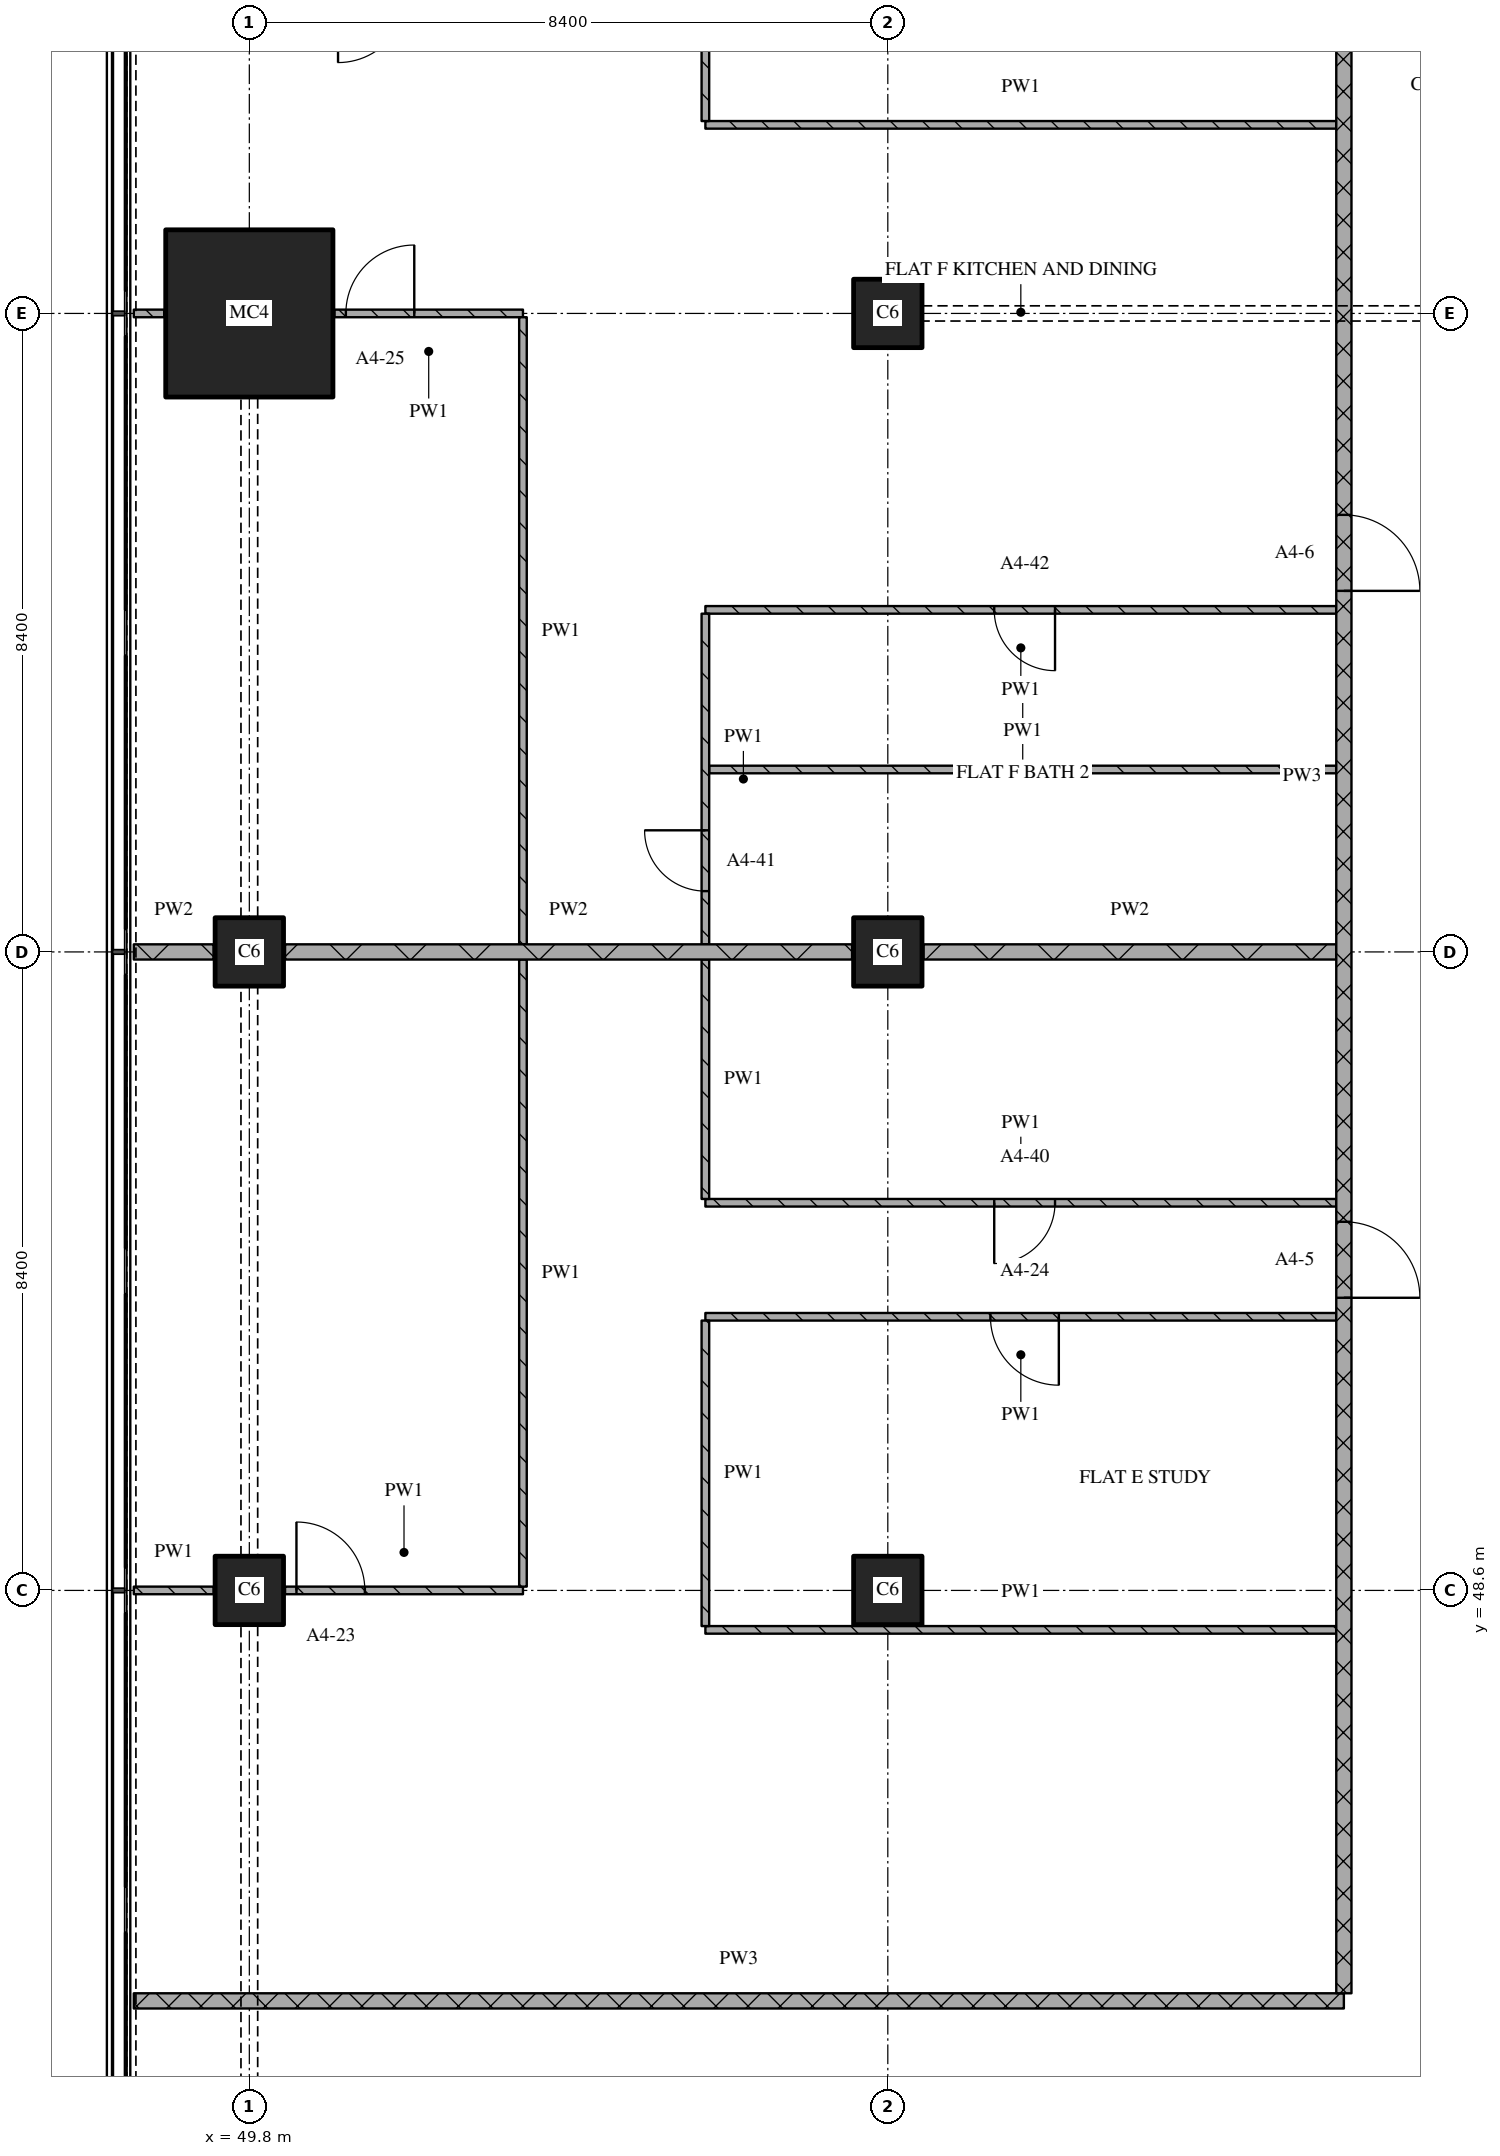
"""IFC4 building model, lengths in metres.
Left out: names, types, materials, properties, quantities, classifications, styles, units other than length and angle.
Written with IfcOpenShell. Run it as: python <this file> out.ifc"""

import sys

from ifc_helpers import new_model, si_unit, direction, frame, frame_2d, origin, origin_2d, place, context, subcontext, project, spatial, rectangle, extrude, element, fill, save


model = new_model("IFC4")
c1 = context("Model", 3, precision=1e-05, world=origin(), true_north=direction((0.0, 1.0)))
c2 = subcontext(c1, "Body", "Model", "MODEL_VIEW")
j1 = project(units=[si_unit("LENGTHUNIT", "METRE"), si_unit("PLANEANGLEUNIT", "RADIAN")], contexts=[c1])
p1 = place(None, origin())
s1 = spatial("IfcSite", under=j1, at=p1, CompositionType="ELEMENT")
p2 = place(p1, origin())
s2 = spatial("IfcBuilding", under=s1, at=p2, CompositionType="ELEMENT")
p3 = place(p2, frame((0.0, 0.0, 73.2)))
s3 = spatial("IfcBuildingStorey", under=s2, at=p3, CompositionType="ELEMENT", Elevation=73.2)
for number, where, z_axis, x_axis in (
    (1, (49.8, 48.6, 0.0), (0.0, 0.0, 1.0), (1.0, 0.0, 0.0)),
    (2, (49.8, 57.0, 0.0), (0.0, 0.0, 1.0), (1.0, 0.0, 0.0)),
):
    element("IfcColumn", number, at=place(p3, frame(where, z_axis=z_axis, x_axis=x_axis)), inside=s3, PredefinedType="COLUMN", context=c2, shape_type="SweptSolid", body=[
        extrude(rectangle(XDim=0.9, YDim=0.9, at=origin_2d()), origin(), (0.0, 0.0, 1.0), 3.6),
    ])
p4 = place(p3, frame((49.8, 65.4, 0.0), z_axis=(0.0, 0.0, 1.0), x_axis=(1.0, 0.0, 0.0)))
e3 = element("IfcColumn", 3, at=p4, inside=s3, PredefinedType="COLUMN", context=c2, shape_type="SweptSolid", body=[
    extrude(rectangle(XDim=2.2, YDim=2.2, at=origin_2d()), origin(), (0.0, 0.0, 1.0), 3.6),
])
for number, where, z_axis, x_axis in (
    (4, (58.2, 48.6, 0.0), (0.0, 0.0, 1.0), (1.0, 0.0, 0.0)),
    (5, (58.2, 57.0, 0.0), (0.0, 0.0, 1.0), (1.0, 0.0, 0.0)),
    (6, (58.2, 65.4, 0.0), (0.0, 0.0, 1.0), (1.0, 0.0, 0.0)),
):
    element("IfcColumn", number, at=place(p3, frame(where, z_axis=z_axis, x_axis=x_axis)), inside=s3, PredefinedType="COLUMN", context=c2, shape_type="SweptSolid", body=[
        extrude(rectangle(XDim=0.9, YDim=0.9, at=origin_2d()), origin(), (0.0, 0.0, 1.0), 3.6),
    ])
p5 = place(p3, frame((48.28, 43.2, 0.0), z_axis=(0.0, 0.0, 1.0), x_axis=(1.0, 0.0, 0.0)))
e7 = element("IfcWall", 7, at=p5, inside=s3, PredefinedType="PARTITIONING", context=c2, shape_type="SweptSolid", body=[
    extrude(rectangle(XDim=15.92, YDim=0.2, at=frame_2d((7.96, 0.0))), origin(), (0.0, 0.0, 1.0), 3.32),
])
p6 = place(p3, frame((55.8, 48.081, 0.0), z_axis=(0.0, 0.0, 1.0), x_axis=(1.0, 0.0, 0.0)))
e8 = element("IfcWall", 8, at=p6, inside=s3, PredefinedType="PARTITIONING", context=c2, shape_type="SweptSolid", body=[
    extrude(rectangle(XDim=8.3, YDim=0.1, at=frame_2d((4.15, 0.0))), origin(), (0.0, 0.0, 1.0), 3.32),
])
p7 = place(p3, frame((48.28, 48.6, 0.0), z_axis=(0.0, 0.0, 1.0), x_axis=(1.0, 0.0, 0.0)))
e9 = element("IfcWall", 9, at=p7, inside=s3, PredefinedType="PARTITIONING", context=c2, shape_type="SweptSolid", body=[
    extrude(rectangle(XDim=1.05, YDim=0.1, at=frame_2d((0.525, 0.0))), origin(), (0.0, 0.0, 1.0), 3.32),
])
p8 = place(p3, frame((50.27, 48.6, 0.0), z_axis=(0.0, 0.0, 1.0), x_axis=(1.0, 0.0, 0.0)))
e10 = element("IfcWall", 10, at=p8, inside=s3, PredefinedType="PARTITIONING", context=c2, shape_type="SweptSolid", body=[
    extrude(rectangle(XDim=3.13, YDim=0.1, at=frame_2d((1.565, 0.0))), origin(), (0.0, 0.0, 1.0), 3.32),
])
p9 = place(p8, frame((0.15, 0.0, 0.0)))
e11 = element("IfcOpeningElement", 11, at=p9, cuts=e10, PredefinedType="OPENING", context=c2, shape_type="SweptSolid", body=[
    extrude(rectangle(XDim=0.9, YDim=2.1, at=frame_2d((0.45, 1.05))), frame((0.0, 0.06, 0.0), z_axis=(0.0, -1.0, 0.0), x_axis=(1.0, 0.0, 0.0)), (0.0, 0.0, 1.0), 0.12),
])
p10 = place(p3, frame((64.1, 52.2, 0.0), z_axis=(0.0, 0.0, 1.0), x_axis=(-1.0, 0.0, 0.0)))
e12 = element("IfcWall", 12, at=p10, inside=s3, PredefinedType="PARTITIONING", context=c2, shape_type="SweptSolid", body=[
    extrude(rectangle(XDim=8.3, YDim=0.1, at=frame_2d((4.15, 0.0))), origin(), (0.0, 0.0, 1.0), 3.32),
])
p11 = place(p10, frame((3.65, 0.0, 0.0)))
e13 = element("IfcOpeningElement", 13, at=p11, cuts=e12, PredefinedType="OPENING", context=c2, shape_type="SweptSolid", body=[
    extrude(rectangle(XDim=0.9, YDim=2.1, at=frame_2d((0.45, 1.05))), frame((0.0, 0.06, 0.0), z_axis=(0.0, -1.0, 0.0), x_axis=(1.0, 0.0, 0.0)), (0.0, 0.0, 1.0), 0.12),
])
p12 = place(p3, frame((55.8, 53.7, 0.0), z_axis=(0.0, 0.0, 1.0), x_axis=(1.0, 0.0, 0.0)))
e14 = element("IfcWall", 14, at=p12, inside=s3, PredefinedType="PARTITIONING", context=c2, shape_type="SweptSolid", body=[
    extrude(rectangle(XDim=8.3, YDim=0.1, at=frame_2d((4.15, 0.0))), origin(), (0.0, 0.0, 1.0), 3.32),
])
p13 = place(p12, frame((3.8, 0.0, 0.0)))
e15 = element("IfcOpeningElement", 15, at=p13, cuts=e14, PredefinedType="OPENING", context=c2, shape_type="SweptSolid", body=[
    extrude(rectangle(XDim=0.8, YDim=2.1, at=frame_2d((0.4, 1.05))), frame((0.0, 0.06, 0.0), z_axis=(0.0, -1.0, 0.0), x_axis=(1.0, 0.0, 0.0)), (0.0, 0.0, 1.0), 0.12),
])
p14 = place(p3, frame((48.28, 57.0, 0.0), z_axis=(0.0, 0.0, 1.0), x_axis=(1.0, 0.0, 0.0)))
e16 = element("IfcWall", 16, at=p14, inside=s3, PredefinedType="PARTITIONING", context=c2, shape_type="SweptSolid", body=[
    extrude(rectangle(XDim=1.05, YDim=0.2, at=frame_2d((0.525, 0.0))), origin(), (0.0, 0.0, 1.0), 3.32),
])
p15 = place(p3, frame((50.27, 57.0, 0.0), z_axis=(0.0, 0.0, 1.0), x_axis=(1.0, 0.0, 0.0)))
e17 = element("IfcWall", 17, at=p15, inside=s3, PredefinedType="PARTITIONING", context=c2, shape_type="SweptSolid", body=[
    extrude(rectangle(XDim=7.46, YDim=0.2, at=frame_2d((3.73, 0.0))), origin(), (0.0, 0.0, 1.0), 3.32),
])
p16 = place(p3, frame((58.67, 57.0, 0.0), z_axis=(0.0, 0.0, 1.0), x_axis=(1.0, 0.0, 0.0)))
e18 = element("IfcWall", 18, at=p16, inside=s3, PredefinedType="PARTITIONING", context=c2, shape_type="SweptSolid", body=[
    extrude(rectangle(XDim=5.43, YDim=0.2, at=frame_2d((2.715, 0.0))), origin(), (0.0, 0.0, 1.0), 3.32),
])
p17 = place(p3, frame((55.85, 59.4, 0.0), z_axis=(0.0, 0.0, 1.0), x_axis=(1.0, 0.0, 0.0)))
e19 = element("IfcWall", 19, at=p17, inside=s3, PredefinedType="PARTITIONING", context=c2, shape_type="SweptSolid", body=[
    extrude(rectangle(XDim=8.25, YDim=0.1, at=frame_2d((4.125, 0.0))), origin(), (0.0, 0.0, 1.0), 3.32),
])
p18 = place(p3, frame((64.1, 61.5, 0.0), z_axis=(0.0, 0.0, 1.0), x_axis=(-1.0, 0.0, 0.0)))
e20 = element("IfcWall", 20, at=p18, inside=s3, PredefinedType="PARTITIONING", context=c2, shape_type="SweptSolid", body=[
    extrude(rectangle(XDim=8.3, YDim=0.1, at=frame_2d((4.15, 0.0))), origin(), (0.0, 0.0, 1.0), 3.32),
])
p19 = place(p18, frame((3.7, 0.0, 0.0)))
e21 = element("IfcOpeningElement", 21, at=p19, cuts=e20, PredefinedType="OPENING", context=c2, shape_type="SweptSolid", body=[
    extrude(rectangle(XDim=0.8, YDim=2.1, at=frame_2d((0.4, 1.05))), frame((0.0, 0.06, 0.0), z_axis=(0.0, -1.0, 0.0), x_axis=(1.0, 0.0, 0.0)), (0.0, 0.0, 1.0), 0.12),
])
p20 = place(p3, frame((48.28, 65.4, 0.0), z_axis=(0.0, 0.0, 1.0), x_axis=(1.0, 0.0, 0.0)))
e22 = element("IfcWall", 22, at=p20, inside=s3, PredefinedType="PARTITIONING", context=c2, shape_type="SweptSolid", body=[
    extrude(rectangle(XDim=0.4, YDim=0.1, at=frame_2d((0.2, 0.0))), origin(), (0.0, 0.0, 1.0), 3.32),
])
p21 = place(p3, frame((53.4, 65.4, 0.0), z_axis=(0.0, 0.0, 1.0), x_axis=(-1.0, 0.0, 0.0)))
e23 = element("IfcWall", 23, at=p21, inside=s3, PredefinedType="PARTITIONING", context=c2, shape_type="SweptSolid", body=[
    extrude(rectangle(XDim=2.48, YDim=0.1, at=frame_2d((1.24, 0.0))), origin(), (0.0, 0.0, 1.0), 3.32),
])
p22 = place(p21, frame((1.43, 0.0, 0.0)))
e24 = element("IfcOpeningElement", 24, at=p22, cuts=e23, PredefinedType="OPENING", context=c2, shape_type="SweptSolid", body=[
    extrude(rectangle(XDim=0.9, YDim=2.1, at=frame_2d((0.45, 1.05))), frame((0.0, 0.06, 0.0), z_axis=(0.0, -1.0, 0.0), x_axis=(1.0, 0.0, 0.0)), (0.0, 0.0, 1.0), 0.12),
])
p23 = place(p3, frame((55.8, 67.881, 0.0), z_axis=(0.0, 0.0, 1.0), x_axis=(1.0, 0.0, 0.0)))
e25 = element("IfcWall", 25, at=p23, inside=s3, PredefinedType="PARTITIONING", context=c2, shape_type="SweptSolid", body=[
    extrude(rectangle(XDim=8.3, YDim=0.1, at=frame_2d((4.15, 0.0))), origin(), (0.0, 0.0, 1.0), 3.32),
])
p24 = place(p3, frame((55.8, 52.15, 0.0), z_axis=(0.0, 0.0, 1.0), x_axis=(0.0, -1.0, 0.0)))
e26 = element("IfcWall", 26, at=p24, inside=s3, PredefinedType="PARTITIONING", context=c2, shape_type="SweptSolid", body=[
    extrude(rectangle(XDim=4.019, YDim=0.1, at=frame_2d((2.009, 0.0))), origin(), (0.0, 0.0, 1.0), 3.32),
])
p25 = place(p3, frame((55.8, 75.32, 0.0), z_axis=(0.0, 0.0, 1.0), x_axis=(0.0, -1.0, 0.0)))
e27 = element("IfcWall", 27, at=p25, inside=s3, PredefinedType="PARTITIONING", context=c2, shape_type="SweptSolid", body=[
    extrude(rectangle(XDim=7.389, YDim=0.1, at=frame_2d((3.695, 0.0))), origin(), (0.0, 0.0, 1.0), 3.32),
])
p26 = place(p25, frame((3.129, 0.0, 0.0)))
e28 = element("IfcOpeningElement", 28, at=p26, cuts=e27, PredefinedType="OPENING", context=c2, shape_type="SweptSolid", body=[
    extrude(rectangle(XDim=0.9, YDim=2.1, at=frame_2d((0.45, 1.05))), frame((0.0, 0.06, 0.0), z_axis=(0.0, -1.0, 0.0), x_axis=(1.0, 0.0, 0.0)), (0.0, 0.0, 1.0), 0.12),
])
p27 = place(p3, frame((64.2, 43.3, 0.0), z_axis=(0.0, 0.0, 1.0), x_axis=(0.0, 1.0, 0.0)))
e29 = element("IfcWall", 29, at=p27, inside=s3, PredefinedType="PARTITIONING", context=c2, shape_type="SweptSolid", body=[
    extrude(rectangle(XDim=32.02, YDim=0.2, at=frame_2d((16.01, 0.0))), origin(), (0.0, 0.0, 1.0), 3.32),
])
p28 = place(p27, frame((9.15, 0.0, 0.0)))
e30 = element("IfcOpeningElement", 30, at=p28, cuts=e29, PredefinedType="OPENING", context=c2, shape_type="SweptSolid", body=[
    extrude(rectangle(XDim=1.0, YDim=2.1, at=frame_2d((0.5, 1.05))), frame((0.0, 0.11, 0.0), z_axis=(0.0, -1.0, 0.0), x_axis=(1.0, 0.0, 0.0)), (0.0, 0.0, 1.0), 0.22),
])
p29 = place(p27, frame((18.45, 0.0, 0.0)))
e31 = element("IfcOpeningElement", 31, at=p29, cuts=e29, PredefinedType="OPENING", context=c2, shape_type="SweptSolid", body=[
    extrude(rectangle(XDim=1.0, YDim=2.1, at=frame_2d((0.5, 1.05))), frame((0.0, 0.11, 0.0), z_axis=(0.0, -1.0, 0.0), x_axis=(1.0, 0.0, 0.0)), (0.0, 0.0, 1.0), 0.22),
])
for number, where, z_axis, x_axis in (
    (32, (53.4, 56.9, 0.0), (0.0, 0.0, 1.0), (0.0, -1.0, 0.0)),
    (33, (53.4, 65.35, 0.0), (0.0, 0.0, 1.0), (0.0, -1.0, 0.0)),
):
    element("IfcWall", number, at=place(p3, frame(where, z_axis=z_axis, x_axis=x_axis)), inside=s3, PredefinedType="PARTITIONING", context=c2, shape_type="SweptSolid", body=[
        extrude(rectangle(XDim=8.25, YDim=0.1, at=frame_2d((4.125, 0.0))), origin(), (0.0, 0.0, 1.0), 3.32),
    ])
p30 = place(p3, frame((55.8, 56.9, 0.0), z_axis=(0.0, 0.0, 1.0), x_axis=(0.0, -1.0, 0.0)))
e34 = element("IfcWall", 34, at=p30, inside=s3, PredefinedType="PARTITIONING", context=c2, shape_type="SweptSolid", body=[
    extrude(rectangle(XDim=3.15, YDim=0.1, at=frame_2d((1.575, 0.0))), origin(), (0.0, 0.0, 1.0), 3.32),
])
p31 = place(p3, frame((55.8, 61.45, 0.0), z_axis=(0.0, 0.0, 1.0), x_axis=(0.0, -1.0, 0.0)))
e35 = element("IfcWall", 35, at=p31, inside=s3, PredefinedType="PARTITIONING", context=c2, shape_type="SweptSolid", body=[
    extrude(rectangle(XDim=4.35, YDim=0.1, at=frame_2d((2.175, 0.0))), origin(), (0.0, 0.0, 1.0), 3.32),
])
p32 = place(p31, frame((2.85, 0.0, 0.0)))
e36 = element("IfcOpeningElement", 36, at=p32, cuts=e35, PredefinedType="OPENING", context=c2, shape_type="SweptSolid", body=[
    extrude(rectangle(XDim=0.8, YDim=2.1, at=frame_2d((0.4, 1.05))), frame((0.0, 0.06, 0.0), z_axis=(0.0, -1.0, 0.0), x_axis=(1.0, 0.0, 0.0)), (0.0, 0.0, 1.0), 0.12),
])
p33 = place(p9, origin())
e37 = element("IfcDoor", 37, at=p33, inside=s3, OperationType="SINGLE_SWING_LEFT", PredefinedType="DOOR", context=c2, shape_type="SweptSolid", body=[
    extrude(rectangle(XDim=0.9, YDim=2.1, at=frame_2d((0.45, 1.05))), frame((0.0, 0.025, 0.0), z_axis=(0.0, -1.0, 0.0), x_axis=(1.0, 0.0, 0.0)), (0.0, 0.0, 1.0), 0.05),
])
fill(e11, e37)
p34 = place(p11, origin())
e38 = element("IfcDoor", 38, at=p34, inside=s3, OperationType="SINGLE_SWING_LEFT", PredefinedType="DOOR", context=c2, shape_type="SweptSolid", body=[
    extrude(rectangle(XDim=0.9, YDim=2.1, at=frame_2d((0.45, 1.05))), frame((0.0, 0.025, 0.0), z_axis=(0.0, -1.0, 0.0), x_axis=(1.0, 0.0, 0.0)), (0.0, 0.0, 1.0), 0.05),
])
fill(e13, e38)
p35 = place(p13, origin())
e39 = element("IfcDoor", 39, at=p35, inside=s3, OperationType="SINGLE_SWING_RIGHT", PredefinedType="DOOR", context=c2, shape_type="SweptSolid", body=[
    extrude(rectangle(XDim=0.8, YDim=2.1, at=frame_2d((0.4, 1.05))), frame((0.0, 0.025, 0.0), z_axis=(0.0, -1.0, 0.0), x_axis=(1.0, 0.0, 0.0)), (0.0, 0.0, 1.0), 0.05),
])
fill(e15, e39)
p36 = place(p19, origin())
e40 = element("IfcDoor", 40, at=p36, inside=s3, OperationType="SINGLE_SWING_LEFT", PredefinedType="DOOR", context=c2, shape_type="SweptSolid", body=[
    extrude(rectangle(XDim=0.8, YDim=2.1, at=frame_2d((0.4, 1.05))), frame((0.0, 0.025, 0.0), z_axis=(0.0, -1.0, 0.0), x_axis=(1.0, 0.0, 0.0)), (0.0, 0.0, 1.0), 0.05),
])
fill(e21, e40)
p37 = place(p22, origin())
e41 = element("IfcDoor", 41, at=p37, inside=s3, OperationType="SINGLE_SWING_RIGHT", PredefinedType="DOOR", context=c2, shape_type="SweptSolid", body=[
    extrude(rectangle(XDim=0.9, YDim=2.1, at=frame_2d((0.45, 1.05))), frame((0.0, 0.025, 0.0), z_axis=(0.0, -1.0, 0.0), x_axis=(1.0, 0.0, 0.0)), (0.0, 0.0, 1.0), 0.05),
])
fill(e24, e41)
p38 = place(p28, origin())
e42 = element("IfcDoor", 42, at=p38, inside=s3, OperationType="SINGLE_SWING_RIGHT", PredefinedType="DOOR", context=c2, shape_type="SweptSolid", body=[
    extrude(rectangle(XDim=1.0, YDim=2.1, at=frame_2d((0.5, 1.05))), frame((0.0, 0.025, 0.0), z_axis=(0.0, -1.0, 0.0), x_axis=(1.0, 0.0, 0.0)), (0.0, 0.0, 1.0), 0.05),
])
fill(e30, e42)
p39 = place(p29, origin())
e43 = element("IfcDoor", 43, at=p39, inside=s3, OperationType="SINGLE_SWING_RIGHT", PredefinedType="DOOR", context=c2, shape_type="SweptSolid", body=[
    extrude(rectangle(XDim=1.0, YDim=2.1, at=frame_2d((0.5, 1.05))), frame((0.0, 0.025, 0.0), z_axis=(0.0, -1.0, 0.0), x_axis=(1.0, 0.0, 0.0)), (0.0, 0.0, 1.0), 0.05),
])
fill(e31, e43)
p40 = place(p32, origin())
e44 = element("IfcDoor", 44, at=p40, inside=s3, OperationType="SINGLE_SWING_RIGHT", PredefinedType="DOOR", context=c2, shape_type="SweptSolid", body=[
    extrude(rectangle(XDim=0.8, YDim=2.1, at=frame_2d((0.4, 1.05))), frame((0.0, 0.025, 0.0), z_axis=(0.0, -1.0, 0.0), x_axis=(1.0, 0.0, 0.0)), (0.0, 0.0, 1.0), 0.05),
])
fill(e36, e44)
save(model, sys.argv[1])
